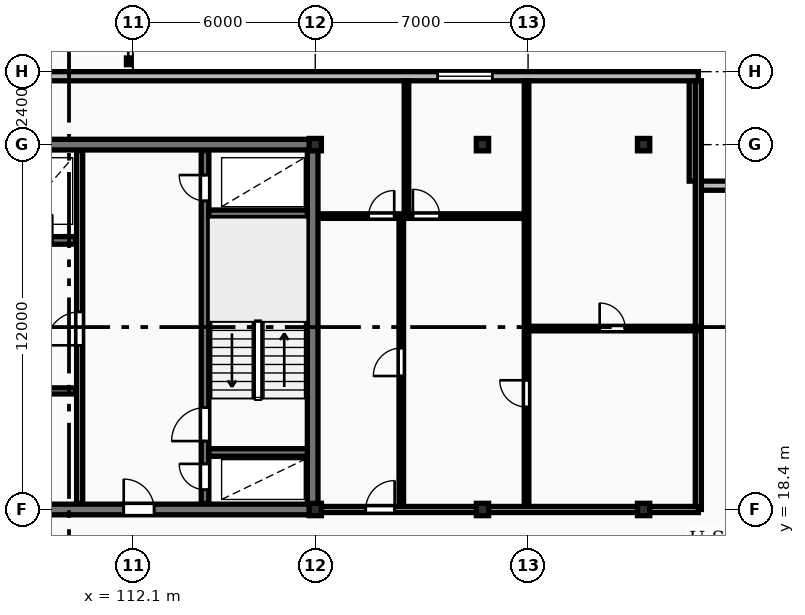
"""IFC4 building model, lengths in metres.
Left out: names, types, materials, properties, quantities, classifications, styles, units other than length and angle.
Written with IfcOpenShell. Run it as: python <this file> out.ifc"""

import sys

from ifc_helpers import new_model, si_unit, direction, frame, frame_2d, origin, origin_2d, place, context, subcontext, project, spatial, rectangle, i_section, extrude, element, fill, save


model = new_model("IFC4")
c1 = context("Model", 3, precision=1e-05, world=origin(), true_north=direction((0.0, 1.0)))
c2 = subcontext(c1, "Body", "Model", "MODEL_VIEW")
j1 = project(units=[si_unit("LENGTHUNIT", "METRE"), si_unit("PLANEANGLEUNIT", "RADIAN")], contexts=[c1])
p1 = place(None, origin())
s1 = spatial("IfcSite", under=j1, at=p1, CompositionType="ELEMENT")
p2 = place(p1, origin())
s2 = spatial("IfcBuilding", under=s1, at=p2, CompositionType="ELEMENT")
p3 = place(p2, frame((0.0, 0.0, 146.5)))
s3 = spatial("IfcBuildingStorey", under=s2, at=p3, CompositionType="ELEMENT", Elevation=146.5)
for number, where, z_axis, x_axis in (
    (1, (118.1, 18.4, 0.0), (0.0, 0.0, 1.0), (1.0, 0.0, 0.0)),
    (2, (118.1, 30.4, 0.0), (0.0, 0.0, 1.0), (1.0, 0.0, 0.0)),
    (3, (123.6, 18.4, 0.0), (0.0, 0.0, 1.0), (1.0, 0.0, 0.0)),
    (4, (123.6, 30.4, 0.0), (0.0, 0.0, 1.0), (1.0, 0.0, 0.0)),
    (5, (128.9, 18.4, 0.0), (0.0, 0.0, 1.0), (1.0, 0.0, 0.0)),
    (6, (128.9, 30.4, 0.0), (0.0, 0.0, 1.0), (1.0, 0.0, 0.0)),
):
    element("IfcColumn", number, at=place(p3, frame(where, z_axis=z_axis, x_axis=x_axis)), inside=s3, PredefinedType="COLUMN", context=c2, shape_type="SweptSolid", body=[
        extrude(i_section(OverallWidth=0.403, OverallDepth=0.406, WebThickness=0.027, FlangeThickness=0.043, FilletRadius=0.015, at=origin_2d()), origin(), (0.0, 0.0, 1.0), 3.6),
    ])
for number, where, z_axis, x_axis in (
    (7, (134.3, 29.05, 0.0), (0.0, 0.0, 1.0), (-1.0, 0.0, 0.0)),
    (8, (130.55, 29.2, 0.0), (0.0, 0.0, 1.0), (0.0, 1.0, 0.0)),
):
    element("IfcWall", number, at=place(p3, frame(where, z_axis=z_axis, x_axis=x_axis)), inside=s3, PredefinedType="STANDARD", context=c2, shape_type="SweptSolid", body=[
        extrude(rectangle(XDim=3.6, YDim=0.3, at=frame_2d((1.8, 0.0))), origin(), (0.0, 0.0, 1.0), 3.31),
    ])
p4 = place(p3, frame((130.7, 32.65, 0.0), z_axis=(0.0, 0.0, 1.0), x_axis=(-1.0, 0.0, 0.0)))
e9 = element("IfcWall", 9, at=p4, inside=s3, PredefinedType="STANDARD", context=c2, shape_type="SweptSolid", body=[
    extrude(rectangle(XDim=58.0, YDim=0.3, at=frame_2d((29.0, 0.0))), origin(), (0.0, 0.0, 1.0), 3.31),
])
p5 = place(p4, frame((50.125, 0.0, 0.85)))
e10 = element("IfcOpeningElement", 10, at=p5, cuts=e9, PredefinedType="OPENING", context=c2, shape_type="SweptSolid", body=[
    extrude(rectangle(XDim=1.8, YDim=1.8, at=frame_2d((0.9, 0.9))), frame((0.0, 0.16, 0.0), z_axis=(0.0, -1.0, 0.0), x_axis=(1.0, 0.0, 0.0)), (0.0, 0.0, 1.0), 0.32),
])
p6 = place(p4, frame((6.775, 0.0, 0.85)))
e11 = element("IfcOpeningElement", 11, at=p6, cuts=e9, PredefinedType="OPENING", context=c2, shape_type="SweptSolid", body=[
    extrude(rectangle(XDim=1.8, YDim=1.8, at=frame_2d((0.9, 0.9))), frame((0.0, 0.16, 0.0), z_axis=(0.0, -1.0, 0.0), x_axis=(1.0, 0.0, 0.0)), (0.0, 0.0, 1.0), 0.32),
])
p7 = place(p4, frame((38.0, 0.0, 0.0)))
e12 = element("IfcOpeningElement", 12, at=p7, cuts=e9, PredefinedType="OPENING", context=c2, shape_type="SweptSolid", body=[
    extrude(rectangle(XDim=1.1, YDim=2.1, at=frame_2d((0.55, 1.05))), frame((0.0, 0.16, 0.0), z_axis=(0.0, -1.0, 0.0), x_axis=(1.0, 0.0, 0.0)), (0.0, 0.0, 1.0), 0.32),
])
p8 = place(p3, frame((81.925, 30.4, 0.0), z_axis=(0.0, 0.0, 1.0), x_axis=(1.0, 0.0, 0.0)))
e13 = element("IfcWall", 13, at=p8, inside=s3, PredefinedType="SHEAR", context=c2, shape_type="SweptSolid", body=[
    extrude(rectangle(XDim=36.265, YDim=0.35, at=frame_2d((18.132, 0.0))), origin(), (0.0, 0.0, 1.0), 3.6),
])
p9 = place(p8, frame((9.675, 0.0, 0.0)))
e14 = element("IfcOpeningElement", 14, at=p9, cuts=e13, PredefinedType="OPENING", context=c2, shape_type="SweptSolid", body=[
    extrude(rectangle(XDim=1.1, YDim=2.1, at=frame_2d((0.55, 1.05))), frame((0.0, 0.185, 0.0), z_axis=(0.0, -1.0, 0.0), x_axis=(1.0, 0.0, 0.0)), (0.0, 0.0, 1.0), 0.37),
])
p10 = place(p3, frame((118.015, 18.575, 0.0), z_axis=(0.0, 0.0, 1.0), x_axis=(0.0, 1.0, 0.0)))
e15 = element("IfcWall", 15, at=p10, inside=s3, PredefinedType="SHEAR", context=c2, shape_type="SweptSolid", body=[
    extrude(rectangle(XDim=11.65, YDim=0.35, at=frame_2d((5.825, 0.0))), origin(), (0.0, 0.0, 1.0), 3.6),
])
p11 = place(p3, frame((81.925, 18.4, 0.0), z_axis=(0.0, 0.0, 1.0), x_axis=(1.0, 0.0, 0.0)))
e16 = element("IfcWall", 16, at=p11, inside=s3, PredefinedType="SHEAR", context=c2, shape_type="SweptSolid", body=[
    extrude(rectangle(XDim=36.265, YDim=0.35, at=frame_2d((18.132, 0.0))), origin(), (0.0, 0.0, 1.0), 3.6),
])
p12 = place(p11, frame((5.675, 0.0, 0.0)))
e17 = element("IfcOpeningElement", 17, at=p12, cuts=e16, PredefinedType="OPENING", context=c2, shape_type="SweptSolid", body=[
    extrude(rectangle(XDim=1.0, YDim=2.15, at=frame_2d((0.5, 1.075))), frame((0.0, 0.185, 0.0), z_axis=(0.0, -1.0, 0.0), x_axis=(1.0, 0.0, 0.0)), (0.0, 0.0, 1.0), 0.37),
])
p13 = place(p11, frame((21.925, 0.0, 0.0)))
e18 = element("IfcOpeningElement", 18, at=p13, cuts=e16, PredefinedType="OPENING", context=c2, shape_type="SweptSolid", body=[
    extrude(rectangle(XDim=1.5, YDim=2.2, at=frame_2d((0.75, 1.1))), frame((0.0, 0.185, 0.0), z_axis=(0.0, -1.0, 0.0), x_axis=(1.0, 0.0, 0.0)), (0.0, 0.0, 1.0), 0.37),
])
p14 = place(p11, frame((29.875, 0.0, 0.0)))
e19 = element("IfcOpeningElement", 19, at=p14, cuts=e16, PredefinedType="OPENING", context=c2, shape_type="SweptSolid", body=[
    extrude(rectangle(XDim=1.0, YDim=2.15, at=frame_2d((0.5, 1.075))), frame((0.0, 0.185, 0.0), z_axis=(0.0, -1.0, 0.0), x_axis=(1.0, 0.0, 0.0)), (0.0, 0.0, 1.0), 0.37),
])
p15 = place(p3, frame((99.68, 27.25, 0.0), z_axis=(0.0, 0.0, 1.0), x_axis=(1.0, 0.0, 0.0)))
e20 = element("IfcWall", 20, at=p15, inside=s3, PredefinedType="SHEAR", context=c2, shape_type="SweptSolid", body=[
    extrude(rectangle(XDim=10.54, YDim=0.25, at=frame_2d((5.27, 0.0))), origin(), (0.0, 0.0, 1.0), 3.6),
])
p16 = place(p15, frame((0.76, 0.0, 0.0)))
e21 = element("IfcOpeningElement", 21, at=p16, cuts=e20, PredefinedType="OPENING", context=c2, shape_type="SweptSolid", body=[
    extrude(rectangle(XDim=1.12, YDim=2.12, at=frame_2d((0.56, 1.06))), frame((0.0, 0.135, 0.0), z_axis=(0.0, -1.0, 0.0), x_axis=(1.0, 0.0, 0.0)), (0.0, 0.0, 1.0), 0.27),
])
p17 = place(p15, frame((3.56, 0.0, 0.0)))
e22 = element("IfcOpeningElement", 22, at=p17, cuts=e20, PredefinedType="OPENING", context=c2, shape_type="SweptSolid", body=[
    extrude(rectangle(XDim=1.12, YDim=2.12, at=frame_2d((0.56, 1.06))), frame((0.0, 0.135, 0.0), z_axis=(0.0, -1.0, 0.0), x_axis=(1.0, 0.0, 0.0)), (0.0, 0.0, 1.0), 0.27),
])
p18 = place(p15, frame((6.36, 0.0, 0.0)))
e23 = element("IfcOpeningElement", 23, at=p18, cuts=e20, PredefinedType="OPENING", context=c2, shape_type="SweptSolid", body=[
    extrude(rectangle(XDim=1.12, YDim=2.12, at=frame_2d((0.56, 1.06))), frame((0.0, 0.135, 0.0), z_axis=(0.0, -1.0, 0.0), x_axis=(1.0, 0.0, 0.0)), (0.0, 0.0, 1.0), 0.27),
])
p19 = place(p15, frame((8.92, 0.0, 0.0)))
e24 = element("IfcOpeningElement", 24, at=p19, cuts=e20, PredefinedType="OPENING", context=c2, shape_type="SweptSolid", body=[
    extrude(rectangle(XDim=0.85, YDim=2.05, at=frame_2d((0.425, 1.025))), frame((0.0, 0.135, 0.0), z_axis=(0.0, -1.0, 0.0), x_axis=(1.0, 0.0, 0.0)), (0.0, 0.0, 1.0), 0.27),
])
p20 = place(p3, frame((91.08, 22.3, 0.0), z_axis=(0.0, 0.0, 1.0), x_axis=(1.0, 0.0, 0.0)))
e25 = element("IfcWall", 25, at=p20, inside=s3, PredefinedType="PARTITIONING", context=c2, shape_type="SweptSolid", body=[
    extrude(rectangle(XDim=19.14, YDim=0.2, at=frame_2d((9.57, 0.0))), origin(), (0.0, 0.0, 1.0), 3.31),
])
p21 = place(p20, frame((1.15, 0.0, 0.0)))
e26 = element("IfcOpeningElement", 26, at=p21, cuts=e25, PredefinedType="OPENING", context=c2, shape_type="SweptSolid", body=[
    extrude(rectangle(XDim=0.85, YDim=2.05, at=frame_2d((0.425, 1.025))), frame((0.0, 0.11, 0.0), z_axis=(0.0, -1.0, 0.0), x_axis=(1.0, 0.0, 0.0)), (0.0, 0.0, 1.0), 0.22),
])
p22 = place(p20, frame((3.2, 0.0, 0.0)))
e27 = element("IfcOpeningElement", 27, at=p22, cuts=e25, PredefinedType="OPENING", context=c2, shape_type="SweptSolid", body=[
    extrude(rectangle(XDim=0.85, YDim=2.05, at=frame_2d((0.425, 1.025))), frame((0.0, 0.11, 0.0), z_axis=(0.0, -1.0, 0.0), x_axis=(1.0, 0.0, 0.0)), (0.0, 0.0, 1.0), 0.22),
])
p23 = place(p20, frame((12.72, 0.0, 0.0)))
e28 = element("IfcOpeningElement", 28, at=p23, cuts=e25, PredefinedType="OPENING", context=c2, shape_type="SweptSolid", body=[
    extrude(rectangle(XDim=1.5, YDim=2.2, at=frame_2d((0.75, 1.1))), frame((0.0, 0.11, 0.0), z_axis=(0.0, -1.0, 0.0), x_axis=(1.0, 0.0, 0.0)), (0.0, 0.0, 1.0), 0.22),
])
p24 = place(p20, frame((5.52, 0.0, 0.0)))
e29 = element("IfcOpeningElement", 29, at=p24, cuts=e25, PredefinedType="OPENING", context=c2, shape_type="SweptSolid", body=[
    extrude(rectangle(XDim=0.88, YDim=2.06, at=frame_2d((0.44, 1.03))), frame((0.0, 0.11, 0.0), z_axis=(0.0, -1.0, 0.0), x_axis=(1.0, 0.0, 0.0)), (0.0, 0.0, 1.0), 0.22),
])
p25 = place(p20, frame((7.67, 0.0, 0.0)))
e30 = element("IfcOpeningElement", 30, at=p25, cuts=e25, PredefinedType="OPENING", context=c2, shape_type="SweptSolid", body=[
    extrude(rectangle(XDim=0.88, YDim=2.06, at=frame_2d((0.44, 1.03))), frame((0.0, 0.11, 0.0), z_axis=(0.0, -1.0, 0.0), x_axis=(1.0, 0.0, 0.0)), (0.0, 0.0, 1.0), 0.22),
])
p26 = place(p20, frame((10.27, 0.0, 0.0)))
e31 = element("IfcOpeningElement", 31, at=p26, cuts=e25, PredefinedType="OPENING", context=c2, shape_type="SweptSolid", body=[
    extrude(rectangle(XDim=0.85, YDim=2.05, at=frame_2d((0.425, 1.025))), frame((0.0, 0.11, 0.0), z_axis=(0.0, -1.0, 0.0), x_axis=(1.0, 0.0, 0.0)), (0.0, 0.0, 1.0), 0.22),
])
p27 = place(p20, frame((15.92, 0.0, 0.0)))
e32 = element("IfcOpeningElement", 32, at=p27, cuts=e25, PredefinedType="OPENING", context=c2, shape_type="SweptSolid", body=[
    extrude(rectangle(XDim=0.96, YDim=2.1, at=frame_2d((0.48, 1.05))), frame((0.0, 0.11, 0.0), z_axis=(0.0, -1.0, 0.0), x_axis=(1.0, 0.0, 0.0)), (0.0, 0.0, 1.0), 0.22),
])
p28 = place(p3, frame((110.35, 18.6, 0.0), z_axis=(0.0, 0.0, 1.0), x_axis=(0.0, 1.0, 0.0)))
e33 = element("IfcWall", 33, at=p28, inside=s3, PredefinedType="PARTITIONING", context=c2, shape_type="SweptSolid", body=[
    extrude(rectangle(XDim=11.6, YDim=0.2, at=frame_2d((5.8, 0.0))), origin(), (0.0, 0.0, 1.0), 3.31),
])
p29 = place(p28, frame((5.2, 0.0, 0.0)))
e34 = element("IfcOpeningElement", 34, at=p29, cuts=e33, PredefinedType="OPENING", context=c2, shape_type="SweptSolid", body=[
    extrude(rectangle(XDim=1.1, YDim=2.15, at=frame_2d((0.55, 1.075))), frame((0.0, 0.11, 0.0), z_axis=(0.0, -1.0, 0.0), x_axis=(1.0, 0.0, 0.0)), (0.0, 0.0, 1.0), 0.22),
])
p30 = place(p3, frame((114.475, 18.6, 0.0), z_axis=(0.0, 0.0, 1.0), x_axis=(0.0, 1.0, 0.0)))
e35 = element("IfcWall", 35, at=p30, inside=s3, PredefinedType="SHEAR", context=c2, shape_type="SweptSolid", body=[
    extrude(rectangle(XDim=11.6, YDim=0.25, at=frame_2d((5.8, 0.0))), origin(), (0.0, 0.0, 1.0), 3.6),
])
p31 = place(p30, frame((0.45, 0.0, 0.0)))
e36 = element("IfcOpeningElement", 36, at=p31, cuts=e35, PredefinedType="OPENING", context=c2, shape_type="SweptSolid", body=[
    extrude(rectangle(XDim=0.85, YDim=2.05, at=frame_2d((0.425, 1.025))), frame((0.0, 0.135, 0.0), z_axis=(0.0, -1.0, 0.0), x_axis=(1.0, 0.0, 0.0)), (0.0, 0.0, 1.0), 0.27),
])
p32 = place(p30, frame((2.05, 0.0, 0.0)))
e37 = element("IfcOpeningElement", 37, at=p32, cuts=e35, PredefinedType="OPENING", context=c2, shape_type="SweptSolid", body=[
    extrude(rectangle(XDim=1.1, YDim=2.1, at=frame_2d((0.55, 1.05))), frame((0.0, 0.135, 0.0), z_axis=(0.0, -1.0, 0.0), x_axis=(1.0, 0.0, 0.0)), (0.0, 0.0, 1.0), 0.27),
])
p33 = place(p30, frame((9.95, 0.0, 0.0)))
e38 = element("IfcOpeningElement", 38, at=p33, cuts=e35, PredefinedType="OPENING", context=c2, shape_type="SweptSolid", body=[
    extrude(rectangle(XDim=0.85, YDim=2.05, at=frame_2d((0.425, 1.025))), frame((0.0, 0.135, 0.0), z_axis=(0.0, -1.0, 0.0), x_axis=(1.0, 0.0, 0.0)), (0.0, 0.0, 1.0), 0.27),
])
for number, where, z_axis, x_axis in (
    (39, (114.6, 20.275, 0.0), (0.0, 0.0, 1.0), (1.0, 0.0, 0.0)),
    (40, (114.6, 28.125, 0.0), (0.0, 0.0, 1.0), (1.0, 0.0, 0.0)),
):
    element("IfcWall", number, at=place(p3, frame(where, z_axis=z_axis, x_axis=x_axis)), inside=s3, PredefinedType="SHEAR", context=c2, shape_type="SweptSolid", body=[
        extrude(rectangle(XDim=3.24, YDim=0.25, at=frame_2d((1.62, 0.0))), origin(), (0.0, 0.0, 1.0), 3.6),
    ])
p34 = place(p3, frame((130.7, 18.4, 0.0), z_axis=(0.0, 0.0, 1.0), x_axis=(0.0, 1.0, 0.0)))
e41 = element("IfcWall", 41, at=p34, inside=s3, PredefinedType="PARTITIONING", context=c2, shape_type="SweptSolid", body=[
    extrude(rectangle(XDim=14.1, YDim=0.2, at=frame_2d((7.05, 0.0))), origin(), (0.0, 0.0, 1.0), 3.31),
])
p35 = place(p3, frame((125.05, 24.35, 0.0), z_axis=(0.0, 0.0, 1.0), x_axis=(1.0, 0.0, 0.0)))
e42 = element("IfcWall", 42, at=p35, inside=s3, PredefinedType="PARTITIONING", context=c2, shape_type="SweptSolid", body=[
    extrude(rectangle(XDim=5.65, YDim=0.15, at=frame_2d((2.825, 0.0))), origin(), (0.0, 0.0, 1.0), 3.31),
])
p36 = place(p35, frame((2.405, 0.0, 0.0)))
e43 = element("IfcOpeningElement", 43, at=p36, cuts=e42, PredefinedType="OPENING", context=c2, shape_type="SweptSolid", body=[
    extrude(rectangle(XDim=0.84, YDim=2.04, at=frame_2d((0.42, 1.02))), frame((0.0, 0.085, 0.0), z_axis=(0.0, -1.0, 0.0), x_axis=(1.0, 0.0, 0.0)), (0.0, 0.0, 1.0), 0.17),
])
p37 = place(p3, frame((125.05, 18.45, 0.0), z_axis=(0.0, 0.0, 1.0), x_axis=(0.0, 1.0, 0.0)))
e44 = element("IfcWall", 44, at=p37, inside=s3, PredefinedType="PARTITIONING", context=c2, shape_type="SweptSolid", body=[
    extrude(rectangle(XDim=14.05, YDim=0.15, at=frame_2d((7.025, 0.0))), origin(), (0.0, 0.0, 1.0), 3.31),
])
p38 = place(p37, frame((3.32, 0.0, 0.0)))
e45 = element("IfcOpeningElement", 45, at=p38, cuts=e44, PredefinedType="OPENING", context=c2, shape_type="SweptSolid", body=[
    extrude(rectangle(XDim=0.88, YDim=2.06, at=frame_2d((0.44, 1.03))), frame((0.0, 0.085, 0.0), z_axis=(0.0, -1.0, 0.0), x_axis=(1.0, 0.0, 0.0)), (0.0, 0.0, 1.0), 0.17),
])
p39 = place(p3, frame((120.93, 18.45, 0.0), z_axis=(0.0, 0.0, 1.0), x_axis=(0.0, 1.0, 0.0)))
e46 = element("IfcWall", 46, at=p39, inside=s3, PredefinedType="PARTITIONING", context=c2, shape_type="SweptSolid", body=[
    extrude(rectangle(XDim=9.6, YDim=0.15, at=frame_2d((4.8, 0.0))), origin(), (0.0, 0.0, 1.0), 3.31),
])
p40 = place(p39, frame((4.34, 0.0, 0.0)))
e47 = element("IfcOpeningElement", 47, at=p40, cuts=e46, PredefinedType="OPENING", context=c2, shape_type="SweptSolid", body=[
    extrude(rectangle(XDim=0.92, YDim=2.08, at=frame_2d((0.46, 1.04))), frame((0.0, 0.085, 0.0), z_axis=(0.0, -1.0, 0.0), x_axis=(1.0, 0.0, 0.0)), (0.0, 0.0, 1.0), 0.17),
])
p41 = place(p3, frame((121.1, 28.05, 0.0), z_axis=(0.0, 0.0, 1.0), x_axis=(0.0, 1.0, 0.0)))
e48 = element("IfcWall", 48, at=p41, inside=s3, PredefinedType="PARTITIONING", context=c2, shape_type="SweptSolid", body=[
    extrude(rectangle(XDim=4.45, YDim=0.15, at=frame_2d((2.225, 0.0))), origin(), (0.0, 0.0, 1.0), 3.31),
])
p42 = place(p3, frame((118.27, 28.05, 0.0), z_axis=(0.0, 0.0, 1.0), x_axis=(1.0, 0.0, 0.0)))
e49 = element("IfcWall", 49, at=p42, inside=s3, PredefinedType="PARTITIONING", context=c2, shape_type="SweptSolid", body=[
    extrude(rectangle(XDim=6.76, YDim=0.15, at=frame_2d((3.38, 0.0))), origin(), (0.0, 0.0, 1.0), 3.31),
])
p43 = place(p42, frame((1.587, 0.0, 0.0)))
e50 = element("IfcOpeningElement", 50, at=p43, cuts=e49, PredefinedType="OPENING", context=c2, shape_type="SweptSolid", body=[
    extrude(rectangle(XDim=0.84, YDim=2.04, at=frame_2d((0.42, 1.02))), frame((0.0, 0.085, 0.0), z_axis=(0.0, -1.0, 0.0), x_axis=(1.0, 0.0, 0.0)), (0.0, 0.0, 1.0), 0.17),
])
p44 = place(p42, frame((3.042, 0.0, 0.0)))
e51 = element("IfcOpeningElement", 51, at=p44, cuts=e49, PredefinedType="OPENING", context=c2, shape_type="SweptSolid", body=[
    extrude(rectangle(XDim=0.88, YDim=2.06, at=frame_2d((0.44, 1.03))), frame((0.0, 0.085, 0.0), z_axis=(0.0, -1.0, 0.0), x_axis=(1.0, 0.0, 0.0)), (0.0, 0.0, 1.0), 0.17),
])
p45 = place(p3, frame((118.25, 18.4, 0.0), z_axis=(0.0, 0.0, 1.0), x_axis=(1.0, 0.0, 0.0)))
e52 = element("IfcWall", 52, at=p45, inside=s3, PredefinedType="PARTITIONING", context=c2, shape_type="SweptSolid", body=[
    extrude(rectangle(XDim=12.45, YDim=0.2, at=frame_2d((6.225, 0.0))), origin(), (0.0, 0.0, 1.0), 2.698),
])
p46 = place(p45, frame((1.51, 0.0, 0.0)))
e53 = element("IfcOpeningElement", 53, at=p46, cuts=e52, PredefinedType="OPENING", context=c2, shape_type="SweptSolid", body=[
    extrude(rectangle(XDim=0.95, YDim=2.15, at=frame_2d((0.475, 1.075))), frame((0.0, 0.11, 0.0), z_axis=(0.0, -1.0, 0.0), x_axis=(1.0, 0.0, 0.0)), (0.0, 0.0, 1.0), 0.22),
])
p47 = place(p6, origin())
e54 = element("IfcWindow", 54, at=p47, inside=s3, PartitioningType="SINGLE_PANEL", PredefinedType="WINDOW", context=c2, shape_type="SweptSolid", body=[
    extrude(rectangle(XDim=1.8, YDim=1.8, at=frame_2d((0.9, 0.9))), frame((0.0, 0.03, 0.0), z_axis=(0.0, -1.0, 0.0), x_axis=(1.0, 0.0, 0.0)), (0.0, 0.0, 1.0), 0.06),
])
fill(e11, e54)
p48 = place(p14, origin())
e55 = element("IfcDoor", 55, at=p48, inside=s3, OperationType="SINGLE_SWING_LEFT", PredefinedType="DOOR", context=c2, shape_type="SweptSolid", body=[
    extrude(rectangle(XDim=1.0, YDim=2.15, at=frame_2d((0.5, 1.075))), frame((0.0, 0.025, 0.0), z_axis=(0.0, -1.0, 0.0), x_axis=(1.0, 0.0, 0.0)), (0.0, 0.0, 1.0), 0.05),
])
fill(e19, e55)
p49 = place(p29, origin())
e56 = element("IfcDoor", 56, at=p49, inside=s3, OperationType="SINGLE_SWING_LEFT", PredefinedType="DOOR", context=c2, shape_type="SweptSolid", body=[
    extrude(rectangle(XDim=1.1, YDim=2.15, at=frame_2d((0.55, 1.075))), frame((0.0, 0.025, 0.0), z_axis=(0.0, -1.0, 0.0), x_axis=(1.0, 0.0, 0.0)), (0.0, 0.0, 1.0), 0.05),
])
fill(e34, e56)
p50 = place(p31, origin())
e57 = element("IfcDoor", 57, at=p50, inside=s3, OperationType="SINGLE_SWING_RIGHT", PredefinedType="DOOR", context=c2, shape_type="SweptSolid", body=[
    extrude(rectangle(XDim=0.85, YDim=2.05, at=frame_2d((0.425, 1.025))), frame((0.0, 0.025, 0.0), z_axis=(0.0, -1.0, 0.0), x_axis=(1.0, 0.0, 0.0)), (0.0, 0.0, 1.0), 0.05),
])
fill(e36, e57)
p51 = place(p32, origin())
e58 = element("IfcDoor", 58, at=p51, inside=s3, OperationType="SINGLE_SWING_LEFT", PredefinedType="DOOR", context=c2, shape_type="SweptSolid", body=[
    extrude(rectangle(XDim=1.1, YDim=2.1, at=frame_2d((0.55, 1.05))), frame((0.0, 0.025, 0.0), z_axis=(0.0, -1.0, 0.0), x_axis=(1.0, 0.0, 0.0)), (0.0, 0.0, 1.0), 0.05),
])
fill(e37, e58)
p52 = place(p33, origin())
e59 = element("IfcDoor", 59, at=p52, inside=s3, OperationType="SINGLE_SWING_RIGHT", PredefinedType="DOOR", context=c2, shape_type="SweptSolid", body=[
    extrude(rectangle(XDim=0.85, YDim=2.05, at=frame_2d((0.425, 1.025))), frame((0.0, 0.025, 0.0), z_axis=(0.0, -1.0, 0.0), x_axis=(1.0, 0.0, 0.0)), (0.0, 0.0, 1.0), 0.05),
])
fill(e38, e59)
p53 = place(p36, origin())
e60 = element("IfcDoor", 60, at=p53, inside=s3, OperationType="SINGLE_SWING_LEFT", PredefinedType="DOOR", context=c2, shape_type="SweptSolid", body=[
    extrude(rectangle(XDim=0.84, YDim=2.04, at=frame_2d((0.42, 1.02))), frame((0.0, 0.025, 0.0), z_axis=(0.0, -1.0, 0.0), x_axis=(1.0, 0.0, 0.0)), (0.0, 0.0, 1.0), 0.05),
])
fill(e43, e60)
p54 = place(p38, origin())
e61 = element("IfcDoor", 61, at=p54, inside=s3, OperationType="SINGLE_SWING_RIGHT", PredefinedType="DOOR", context=c2, shape_type="SweptSolid", body=[
    extrude(rectangle(XDim=0.88, YDim=2.06, at=frame_2d((0.44, 1.03))), frame((0.0, 0.025, 0.0), z_axis=(0.0, -1.0, 0.0), x_axis=(1.0, 0.0, 0.0)), (0.0, 0.0, 1.0), 0.05),
])
fill(e45, e61)
p55 = place(p40, origin())
e62 = element("IfcDoor", 62, at=p55, inside=s3, OperationType="SINGLE_SWING_LEFT", PredefinedType="DOOR", context=c2, shape_type="SweptSolid", body=[
    extrude(rectangle(XDim=0.92, YDim=2.08, at=frame_2d((0.46, 1.04))), frame((0.0, 0.025, 0.0), z_axis=(0.0, -1.0, 0.0), x_axis=(1.0, 0.0, 0.0)), (0.0, 0.0, 1.0), 0.05),
])
fill(e47, e62)
p56 = place(p43, origin())
e63 = element("IfcDoor", 63, at=p56, inside=s3, OperationType="SINGLE_SWING_RIGHT", PredefinedType="DOOR", context=c2, shape_type="SweptSolid", body=[
    extrude(rectangle(XDim=0.84, YDim=2.04, at=frame_2d((0.42, 1.02))), frame((0.0, 0.025, 0.0), z_axis=(0.0, -1.0, 0.0), x_axis=(1.0, 0.0, 0.0)), (0.0, 0.0, 1.0), 0.05),
])
fill(e50, e63)
p57 = place(p44, origin())
e64 = element("IfcDoor", 64, at=p57, inside=s3, OperationType="SINGLE_SWING_LEFT", PredefinedType="DOOR", context=c2, shape_type="SweptSolid", body=[
    extrude(rectangle(XDim=0.88, YDim=2.06, at=frame_2d((0.44, 1.03))), frame((0.0, 0.025, 0.0), z_axis=(0.0, -1.0, 0.0), x_axis=(1.0, 0.0, 0.0)), (0.0, 0.0, 1.0), 0.05),
])
fill(e51, e64)
p58 = place(p46, origin())
e65 = element("IfcDoor", 65, at=p58, inside=s3, OperationType="SINGLE_SWING_RIGHT", PredefinedType="DOOR", context=c2, shape_type="SweptSolid", body=[
    extrude(rectangle(XDim=0.95, YDim=2.15, at=frame_2d((0.475, 1.075))), frame((0.0, 0.025, 0.0), z_axis=(0.0, -1.0, 0.0), x_axis=(1.0, 0.0, 0.0)), (0.0, 0.0, 1.0), 0.05),
])
fill(e53, e65)
save(model, sys.argv[1])
